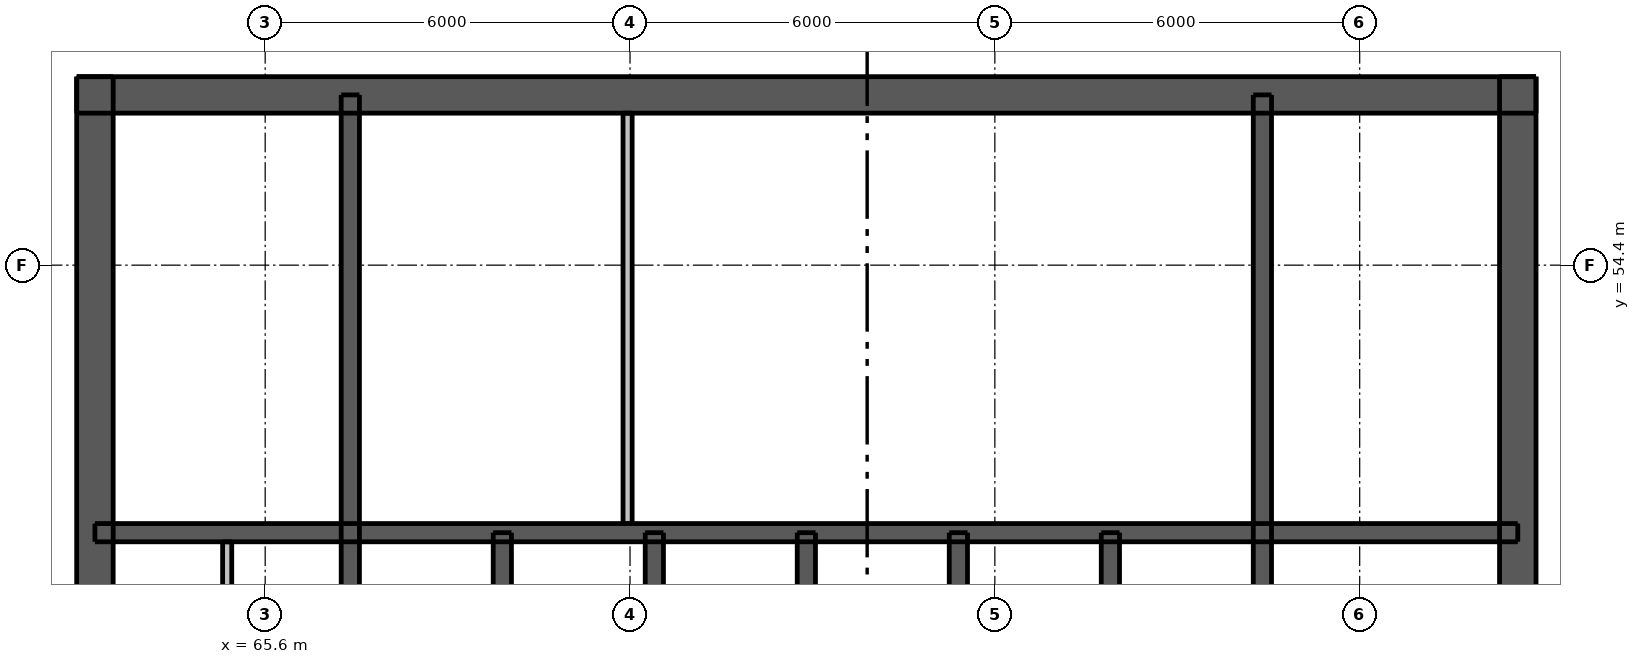
"""IFC4 building model, lengths in metres.
Left out: names, types, materials, properties, quantities, classifications, styles, units other than length and angle.
Written with IfcOpenShell. Run it as: python <this file> out.ifc"""

import sys

from ifc_helpers import new_model, si_unit, direction, frame, frame_2d, origin, place, context, subcontext, project, spatial, rectangle, extrude, element, fill, save


model = new_model("IFC4")
c1 = context("Model", 3, precision=1e-05, world=origin(), true_north=direction((0.0, 1.0)))
c2 = subcontext(c1, "Body", "Model", "MODEL_VIEW")
j1 = project(units=[si_unit("LENGTHUNIT", "METRE"), si_unit("PLANEANGLEUNIT", "RADIAN")], contexts=[c1])
p1 = place(None, origin())
s1 = spatial("IfcSite", under=j1, at=p1, CompositionType="ELEMENT")
p2 = place(p1, origin())
s2 = spatial("IfcBuilding", under=s1, at=p2, CompositionType="ELEMENT")
p3 = place(p2, frame((0.0, 0.0, 203.5)))
s3 = spatial("IfcBuildingStorey", under=s2, at=p3, CompositionType="ELEMENT", Elevation=203.5)
p4 = place(p3, frame((62.5, 57.2, 0.0), z_axis=(0.0, 0.0, 1.0), x_axis=(1.0, 0.0, 0.0)))
e1 = element("IfcWall", 1, at=p4, inside=s3, PredefinedType="SHEAR", context=c2, shape_type="SweptSolid", body=[
    extrude(rectangle(XDim=24.0, YDim=0.6, at=frame_2d((12.0, 0.0))), origin(), (0.0, 0.0, 1.0), 3.05),
])
p5 = place(p4, frame((20.975, 0.0, 0.0)))
e2 = element("IfcOpeningElement", 2, at=p5, cuts=e1, PredefinedType="OPENING", context=c2, shape_type="SweptSolid", body=[
    extrude(rectangle(XDim=1.1, YDim=2.1, at=frame_2d((0.55, 1.05))), frame((0.0, 0.31, 0.0), z_axis=(0.0, -1.0, 0.0), x_axis=(1.0, 0.0, 0.0)), (0.0, 0.0, 1.0), 0.62),
])
p6 = place(p4, frame((1.925, 0.0, 0.0)))
e3 = element("IfcOpeningElement", 3, at=p6, cuts=e1, PredefinedType="OPENING", context=c2, shape_type="SweptSolid", body=[
    extrude(rectangle(XDim=1.1, YDim=2.1, at=frame_2d((0.55, 1.05))), frame((0.0, 0.31, 0.0), z_axis=(0.0, -1.0, 0.0), x_axis=(1.0, 0.0, 0.0)), (0.0, 0.0, 1.0), 0.62),
])
p7 = place(p4, frame((6.405, 0.0, 0.0)))
e4 = element("IfcOpeningElement", 4, at=p7, cuts=e1, PredefinedType="OPENING", context=c2, shape_type="SweptSolid", body=[
    extrude(rectangle(XDim=0.9, YDim=2.1, at=frame_2d((0.45, 1.05))), frame((0.0, 0.31, 0.0), z_axis=(0.0, -1.0, 0.0), x_axis=(1.0, 0.0, 0.0)), (0.0, 0.0, 1.0), 0.62),
])
p8 = place(p4, frame((13.755, 0.0, 0.0)))
e5 = element("IfcOpeningElement", 5, at=p8, cuts=e1, PredefinedType="OPENING", context=c2, shape_type="SweptSolid", body=[
    extrude(rectangle(XDim=0.9, YDim=2.1, at=frame_2d((0.45, 1.05))), frame((0.0, 0.31, 0.0), z_axis=(0.0, -1.0, 0.0), x_axis=(1.0, 0.0, 0.0)), (0.0, 0.0, 1.0), 0.62),
])
p9 = place(p3, frame((62.8, 33.5, 0.0), z_axis=(0.0, 0.0, 1.0), x_axis=(0.0, 1.0, 0.0)))
e6 = element("IfcWall", 6, at=p9, inside=s3, PredefinedType="SHEAR", context=c2, shape_type="SweptSolid", body=[
    extrude(rectangle(XDim=24.0, YDim=0.6, at=frame_2d((12.0, 0.0))), origin(), (0.0, 0.0, 1.0), 3.05),
])
p10 = place(p9, frame((11.2, 0.0, 0.0)))
e7 = element("IfcOpeningElement", 7, at=p10, cuts=e6, PredefinedType="OPENING", context=c2, shape_type="SweptSolid", body=[
    extrude(rectangle(XDim=1.6, YDim=2.1, at=frame_2d((0.8, 1.05))), frame((0.0, 0.31, 0.0), z_axis=(0.0, -1.0, 0.0), x_axis=(1.0, 0.0, 0.0)), (0.0, 0.0, 1.0), 0.62),
])
p11 = place(p3, frame((86.2, 33.5, 0.0), z_axis=(0.0, 0.0, 1.0), x_axis=(0.0, 1.0, 0.0)))
e8 = element("IfcWall", 8, at=p11, inside=s3, PredefinedType="SHEAR", context=c2, shape_type="SweptSolid", body=[
    extrude(rectangle(XDim=24.0, YDim=0.6, at=frame_2d((12.0, 0.0))), origin(), (0.0, 0.0, 1.0), 3.05),
])
p12 = place(p11, frame((11.2, 0.0, 0.0)))
e9 = element("IfcOpeningElement", 9, at=p12, cuts=e8, PredefinedType="OPENING", context=c2, shape_type="SweptSolid", body=[
    extrude(rectangle(XDim=1.6, YDim=2.1, at=frame_2d((0.8, 1.05))), frame((0.0, 0.31, 0.0), z_axis=(0.0, -1.0, 0.0), x_axis=(1.0, 0.0, 0.0)), (0.0, 0.0, 1.0), 0.62),
])
p13 = place(p3, frame((62.8, 50.0, 0.0), z_axis=(0.0, 0.0, 1.0), x_axis=(1.0, 0.0, 0.0)))
e10 = element("IfcWall", 10, at=p13, inside=s3, PredefinedType="SHEAR", context=c2, shape_type="SweptSolid", body=[
    extrude(rectangle(XDim=23.4, YDim=0.3, at=frame_2d((11.7, 0.0))), origin(), (0.0, 0.0, 1.0), 3.05),
])
for number, where, z_axis, x_axis in (
    (11, (67.0, 47.1, 0.0), (0.0, 0.0, 1.0), (0.0, 1.0, 0.0)),
    (12, (82.0, 47.1, 0.0), (0.0, 0.0, 1.0), (0.0, 1.0, 0.0)),
):
    element("IfcWall", number, at=place(p3, frame(where, z_axis=z_axis, x_axis=x_axis)), inside=s3, PredefinedType="SHEAR", context=c2, shape_type="SweptSolid", body=[
        extrude(rectangle(XDim=10.1, YDim=0.3, at=frame_2d((5.05, 0.0))), origin(), (0.0, 0.0, 1.0), 3.05),
    ])
for number, where, z_axis, x_axis in (
    (13, (69.5, 47.1, 0.0), (0.0, 0.0, 1.0), (0.0, 1.0, 0.0)),
    (14, (72.0, 47.1, 0.0), (0.0, 0.0, 1.0), (0.0, 1.0, 0.0)),
    (15, (74.5, 47.1, 0.0), (0.0, 0.0, 1.0), (0.0, 1.0, 0.0)),
    (16, (77.0, 47.1, 0.0), (0.0, 0.0, 1.0), (0.0, 1.0, 0.0)),
    (17, (79.5, 47.1, 0.0), (0.0, 0.0, 1.0), (0.0, 1.0, 0.0)),
):
    element("IfcWall", number, at=place(p3, frame(where, z_axis=z_axis, x_axis=x_axis)), inside=s3, PredefinedType="SHEAR", context=c2, shape_type="SweptSolid", body=[
        extrude(rectangle(XDim=2.9, YDim=0.3, at=frame_2d((1.45, 0.0))), origin(), (0.0, 0.0, 1.0), 3.05),
    ])
p14 = place(p3, frame((64.975, 47.25, 0.0), z_axis=(0.0, 0.0, 1.0), x_axis=(0.0, 1.0, 0.0)))
e18 = element("IfcWall", 18, at=p14, inside=s3, PredefinedType="PLUMBINGWALL", context=c2, shape_type="SweptSolid", body=[
    extrude(rectangle(XDim=2.6, YDim=0.15, at=frame_2d((1.3, 0.0))), origin(), (0.0, 0.0, 1.0), 3.05),
])
p15 = place(p3, frame((71.56, 50.15, 0.0), z_axis=(0.0, 0.0, 1.0), x_axis=(0.0, 1.0, 0.0)))
e19 = element("IfcWall", 19, at=p15, inside=s3, PredefinedType="PLUMBINGWALL", context=c2, shape_type="SweptSolid", body=[
    extrude(rectangle(XDim=6.75, YDim=0.15, at=frame_2d((3.375, 0.0))), origin(), (0.0, 0.0, 1.0), 3.05),
])
p16 = place(p5, origin())
e20 = element("IfcDoor", 20, at=p16, inside=s3, OperationType="SINGLE_SWING_RIGHT", PredefinedType="DOOR", context=c2, shape_type="SweptSolid", body=[
    extrude(rectangle(XDim=1.1, YDim=2.1, at=frame_2d((0.55, 1.05))), frame((0.0, -0.237, 0.0), z_axis=(0.0, -1.0, 0.0), x_axis=(1.0, 0.0, 0.0)), (0.0, 0.0, 1.0), 0.05),
])
fill(e2, e20)
p17 = place(p6, origin())
e21 = element("IfcDoor", 21, at=p17, inside=s3, OperationType="SINGLE_SWING_LEFT", PredefinedType="DOOR", context=c2, shape_type="SweptSolid", body=[
    extrude(rectangle(XDim=1.1, YDim=2.1, at=frame_2d((0.55, 1.05))), frame((0.0, -0.237, 0.0), z_axis=(0.0, -1.0, 0.0), x_axis=(1.0, 0.0, 0.0)), (0.0, 0.0, 1.0), 0.05),
])
fill(e3, e21)
p18 = place(p7, origin())
e22 = element("IfcDoor", 22, at=p18, inside=s3, OperationType="SINGLE_SWING_RIGHT", PredefinedType="DOOR", context=c2, shape_type="SweptSolid", body=[
    extrude(rectangle(XDim=0.9, YDim=2.1, at=frame_2d((0.45, 1.05))), frame((0.0, -0.237, 0.0), z_axis=(0.0, -1.0, 0.0), x_axis=(1.0, 0.0, 0.0)), (0.0, 0.0, 1.0), 0.05),
])
fill(e4, e22)
p19 = place(p8, origin())
e23 = element("IfcDoor", 23, at=p19, inside=s3, OperationType="SINGLE_SWING_RIGHT", PredefinedType="DOOR", context=c2, shape_type="SweptSolid", body=[
    extrude(rectangle(XDim=0.9, YDim=2.1, at=frame_2d((0.45, 1.05))), frame((0.0, -0.237, 0.0), z_axis=(0.0, -1.0, 0.0), x_axis=(1.0, 0.0, 0.0)), (0.0, 0.0, 1.0), 0.05),
])
fill(e5, e23)
save(model, sys.argv[1])
